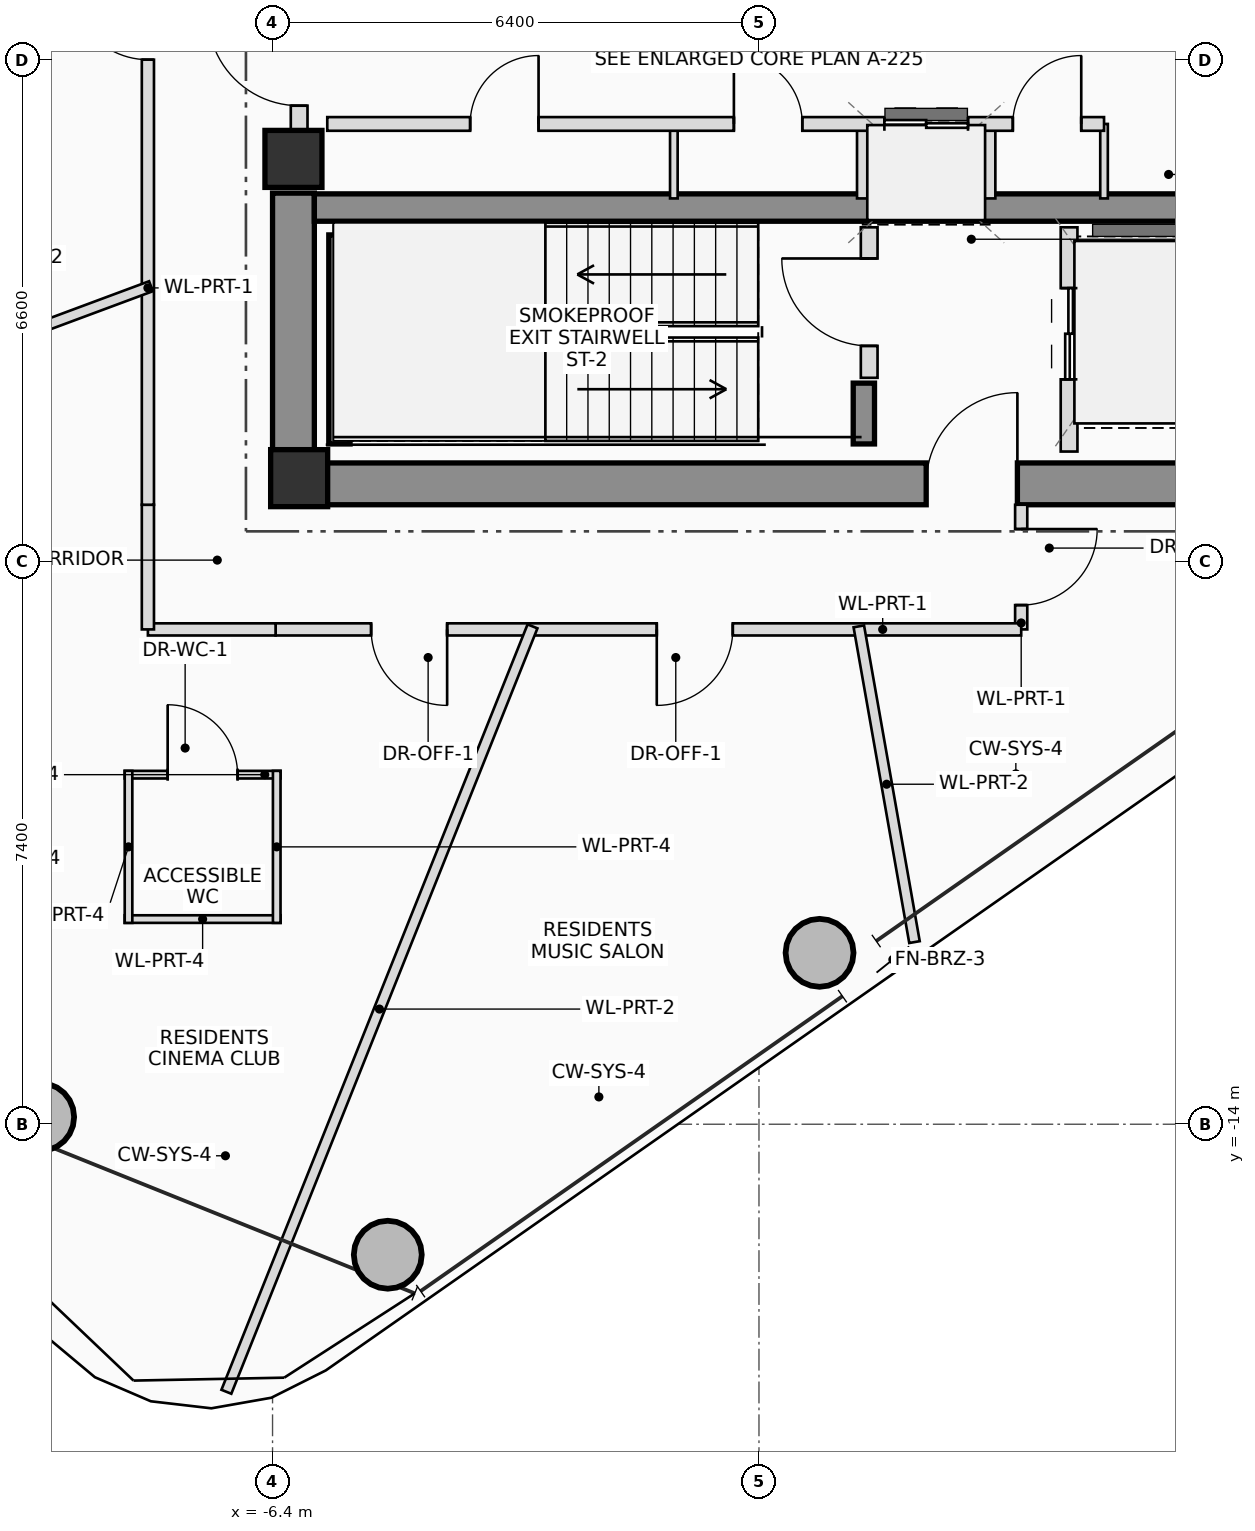
"""IFC4 building model, lengths in metres.
Left out: names, types, materials, properties, quantities, classifications, styles, units other than length and angle.
Written with IfcOpenShell. Run it as: python <this file> out.ifc"""

import sys

from ifc_helpers import new_model, si_unit, direction, frame, frame_2d, origin, origin_2d, place, context, subcontext, project, spatial, rectangle, hollow_circle, extrude, source, transform, mapped, element, fill, save


model = new_model("IFC4")
c1 = context("Model", 3, precision=1e-05, world=origin(), true_north=direction((0.0, 1.0)))
c2 = subcontext(c1, "Body", "Model", "MODEL_VIEW")
j1 = project(units=[si_unit("LENGTHUNIT", "METRE"), si_unit("PLANEANGLEUNIT", "RADIAN")], contexts=[c1])
p1 = place(None, origin())
s1 = spatial("IfcSite", under=j1, at=p1, CompositionType="ELEMENT")
p2 = place(p1, origin())
s2 = spatial("IfcBuilding", under=s1, at=p2, CompositionType="ELEMENT")
p3 = place(p2, frame((0.0, 0.0, 267.75)))
s3 = spatial("IfcBuildingStorey", under=s2, at=p3, CompositionType="ELEMENT", Elevation=267.75)
m1 = source(origin(), c2, "Body", "SweptSolid", [
    extrude(rectangle(XDim=0.75, YDim=0.75, at=origin_2d()), origin(), (0.0, 0.0, 1.0), 3.4),
])
p4 = place(p3, frame((-6.05, -5.5, 0.0), z_axis=(0.0, 0.0, 1.0), x_axis=(1.0, 0.0, 0.0)))
e1 = element("IfcColumn", 1, at=p4, inside=s3, PredefinedType="COLUMN", context=c2, shape_type="MappedRepresentation", body=[
    mapped(m1, transform((0.0, 0.0, 0.0), scale=1.0)),
])
p5 = place(p3, frame((-6.4, -5.575, 0.0), z_axis=(0.0, 0.0, 1.0), x_axis=(1.0, 0.0, 0.0)))
e2 = element("IfcWall", 2, at=p5, inside=s3, PredefinedType="SHEAR", context=c2, shape_type="SweptSolid", body=[
    extrude(rectangle(XDim=12.8, YDim=0.55, at=frame_2d((6.4, 0.0))), origin(), (0.0, 0.0, 1.0), 3.4),
])
p6 = place(p5, frame((8.6, 0.0, 0.0)))
e3 = element("IfcOpeningElement", 3, at=p6, cuts=e2, PredefinedType="OPENING", context=c2, shape_type="SweptSolid", body=[
    extrude(rectangle(XDim=1.2, YDim=2.2, at=frame_2d((0.6, 1.1))), frame((0.0, 0.285, 0.0), z_axis=(0.0, -1.0, 0.0), x_axis=(1.0, 0.0, 0.0)), (0.0, 0.0, 1.0), 0.57),
])
p7 = place(p3, frame((-6.125, -5.3, 0.0), z_axis=(0.0, 0.0, 1.0), x_axis=(0.0, 1.0, 0.0)))
e4 = element("IfcWall", 4, at=p7, inside=s3, PredefinedType="SHEAR", context=c2, shape_type="SweptSolid", body=[
    extrude(rectangle(XDim=3.55, YDim=0.55, at=frame_2d((1.775, 0.0))), origin(), (0.0, 0.0, 1.0), 3.4),
])
p8 = place(p3, frame((-5.85, -1.94, 0.0), z_axis=(0.0, 0.0, 1.0), x_axis=(1.0, 0.0, 0.0)))
e5 = element("IfcWall", 5, at=p8, inside=s3, PredefinedType="SHEAR", context=c2, shape_type="SweptSolid", body=[
    extrude(rectangle(XDim=11.7, YDim=0.36, at=frame_2d((5.85, 0.0))), origin(), (0.0, 0.0, 1.0), 3.4),
])
p9 = place(p3, frame((-5.52, -5.05, 0.0), z_axis=(0.0, 0.0, 1.0), x_axis=(0.0, 1.0, 0.0)))
e6 = element("IfcWall", 6, at=p9, inside=s3, PredefinedType="SHEAR", context=c2, shape_type="SweptSolid", body=[
    extrude(rectangle(XDim=2.75, YDim=0.28, at=frame_2d((1.375, 0.0))), origin(), (0.0, 0.0, 1.0), 3.4),
])
p10 = place(p3, frame((1.38, -5.05, 0.0), z_axis=(0.0, 0.0, 1.0), x_axis=(0.0, 1.0, 0.0)))
e7 = element("IfcWall", 7, at=p10, inside=s3, PredefinedType="SHEAR", context=c2, shape_type="SweptSolid", body=[
    extrude(rectangle(XDim=0.8, YDim=0.28, at=frame_2d((0.4, 0.0))), origin(), (0.0, 0.0, 1.0), 3.4),
])
p11 = place(p3, frame((-6.125, -1.3, 0.0), z_axis=(0.0, 0.0, 1.0), x_axis=(1.0, 0.0, 0.0)))
e8 = element("IfcColumn", 8, at=p11, inside=s3, PredefinedType="COLUMN", context=c2, shape_type="MappedRepresentation", body=[
    mapped(m1, transform((0.0, 0.0, 0.0), scale=1.0)),
])
m2 = source(origin(), c2, "Body", "SweptSolid", [
    extrude(hollow_circle(Radius=0.45, WallThickness=0.032, at=origin_2d()), origin(), (0.0, 0.0, 1.0), 3.4),
])
for number, where, z_axis, x_axis in (
    (9, (-4.884, -15.717, 0.0), (0.0, 0.0, 1.0), (1.0, 0.0, 0.0)),
    (10, (0.797, -11.745, 0.0), (0.0, 0.0, 1.0), (1.0, 0.0, 0.0)),
    (11, (-9.458, -13.905, 0.0), (0.0, 0.0, 1.0), (1.0, 0.0, 0.0)),
):
    element("IfcColumn", number, at=place(p3, frame(where, z_axis=z_axis, x_axis=x_axis)), inside=s3, PredefinedType="COLUMN", context=c2, shape_type="MappedRepresentation", body=[
        mapped(m2, transform((0.0, 0.0, 0.0), scale=1.0)),
    ])
p12 = place(p3, frame((-6.05, -0.95, 0.0), z_axis=(0.0, 0.0, 1.0), x_axis=(0.0, 1.0, 0.0)))
e12 = element("IfcWall", 12, at=p12, inside=s3, PredefinedType="PLUMBINGWALL", context=c2, shape_type="SweptSolid", body=[
    extrude(rectangle(XDim=1.9, YDim=0.22, at=frame_2d((0.95, 0.0))), origin(), (0.0, 0.0, 1.0), 2.18),
])
p13 = place(p12, frame((0.35, 0.0, 0.0)))
e13 = element("IfcOpeningElement", 13, at=p13, cuts=e12, PredefinedType="OPENING", context=c2, shape_type="SweptSolid", body=[
    extrude(rectangle(XDim=1.2, YDim=2.2, at=frame_2d((0.6, 1.1))), frame((0.0, 0.12, 0.0), z_axis=(0.0, -1.0, 0.0), x_axis=(1.0, 0.0, 0.0)), (0.0, 0.0, 1.0), 0.24),
])
p14 = place(p3, frame((1.45, -4.18, 0.0), z_axis=(0.0, 0.0, 1.0), x_axis=(0.0, 1.0, 0.0)))
e14 = element("IfcWall", 14, at=p14, inside=s3, PredefinedType="PLUMBINGWALL", context=c2, shape_type="SweptSolid", body=[
    extrude(rectangle(XDim=1.98, YDim=0.22, at=frame_2d((0.99, 0.0))), origin(), (0.0, 0.0, 1.0), 3.2),
])
p15 = place(p14, frame((0.42, 0.0, 0.0)))
e15 = element("IfcOpeningElement", 15, at=p15, cuts=e14, PredefinedType="OPENING", context=c2, shape_type="SweptSolid", body=[
    extrude(rectangle(XDim=1.15, YDim=2.15, at=frame_2d((0.575, 1.075))), frame((0.0, 0.12, 0.0), z_axis=(0.0, -1.0, 0.0), x_axis=(1.0, 0.0, 0.0)), (0.0, 0.0, 1.0), 0.24),
])
p16 = place(p3, frame((4.08, -5.15, 0.0), z_axis=(0.0, 0.0, 1.0), x_axis=(0.0, 1.0, 0.0)))
e16 = element("IfcWall", 16, at=p16, inside=s3, PredefinedType="PLUMBINGWALL", context=c2, shape_type="SweptSolid", body=[
    extrude(rectangle(XDim=2.95, YDim=0.22, at=frame_2d((1.475, 0.0))), origin(), (0.0, 0.0, 1.0), 3.2),
])
p17 = place(p16, frame((0.95, 0.0, 0.0)))
e17 = element("IfcOpeningElement", 17, at=p17, cuts=e16, PredefinedType="OPENING", context=c2, shape_type="SweptSolid", body=[
    extrude(rectangle(XDim=1.2, YDim=2.25, at=frame_2d((0.6, 1.125))), frame((0.0, 0.12, 0.0), z_axis=(0.0, -1.0, 0.0), x_axis=(1.0, 0.0, 0.0)), (0.0, 0.0, 1.0), 0.24),
])
p18 = place(p3, frame((-1.12, -1.82, 0.0), z_axis=(0.0, 0.0, 1.0), x_axis=(0.0, 1.0, 0.0)))
e18 = element("IfcWall", 18, at=p18, inside=s3, PredefinedType="PARTITIONING", context=c2, shape_type="SweptSolid", body=[
    extrude(rectangle(XDim=0.98, YDim=0.1, at=frame_2d((0.49, 0.0))), origin(), (0.0, 0.0, 1.0), 3.2),
])
for number, where, z_axis, x_axis in (
    (19, (1.38, -1.82, 0.0), (0.0, 0.0, 1.0), (0.0, 1.0, 0.0)),
    (20, (3.02, -1.82, 0.0), (0.0, 0.0, 1.0), (0.0, 1.0, 0.0)),
):
    element("IfcWall", number, at=place(p3, frame(where, z_axis=z_axis, x_axis=x_axis)), inside=s3, PredefinedType="PLUMBINGWALL", context=c2, shape_type="SweptSolid", body=[
        extrude(rectangle(XDim=0.98, YDim=0.18, at=frame_2d((0.49, 0.0))), origin(), (0.0, 0.0, 1.0), 3.2),
    ])
p19 = place(p3, frame((4.54, -1.82, 0.0), z_axis=(0.0, 0.0, 1.0), x_axis=(0.0, 1.0, 0.0)))
e21 = element("IfcWall", 21, at=p19, inside=s3, PredefinedType="PARTITIONING", context=c2, shape_type="SweptSolid", body=[
    extrude(rectangle(XDim=0.98, YDim=0.1, at=frame_2d((0.49, 0.0))), origin(), (0.0, 0.0, 1.0), 3.2),
])
p20 = place(p3, frame((-5.68, -0.84, 0.0), z_axis=(0.0, 0.0, 1.0), x_axis=(1.0, 0.0, 0.0)))
e22 = element("IfcWall", 22, at=p20, inside=s3, PredefinedType="PLUMBINGWALL", context=c2, shape_type="SweptSolid", body=[
    extrude(rectangle(XDim=10.22, YDim=0.18, at=frame_2d((5.11, 0.0))), origin(), (0.0, 0.0, 1.0), 3.2),
])
p21 = place(p20, frame((1.88, 0.0, 0.0)))
e23 = element("IfcOpeningElement", 23, at=p21, cuts=e22, PredefinedType="OPENING", context=c2, shape_type="SweptSolid", body=[
    extrude(rectangle(XDim=0.9, YDim=2.05, at=frame_2d((0.45, 1.025))), frame((0.0, 0.1, 0.0), z_axis=(0.0, -1.0, 0.0), x_axis=(1.0, 0.0, 0.0)), (0.0, 0.0, 1.0), 0.2),
])
p22 = place(p20, frame((5.35, 0.0, 0.0)))
e24 = element("IfcOpeningElement", 24, at=p22, cuts=e22, PredefinedType="OPENING", context=c2, shape_type="SweptSolid", body=[
    extrude(rectangle(XDim=0.9, YDim=2.05, at=frame_2d((0.45, 1.025))), frame((0.0, 0.1, 0.0), z_axis=(0.0, -1.0, 0.0), x_axis=(1.0, 0.0, 0.0)), (0.0, 0.0, 1.0), 0.2),
])
p23 = place(p20, frame((7.33, 0.0, 0.0)))
e25 = element("IfcOpeningElement", 25, at=p23, cuts=e22, PredefinedType="OPENING", context=c2, shape_type="SweptSolid", body=[
    extrude(rectangle(XDim=1.1, YDim=2.2, at=frame_2d((0.55, 1.1))), frame((0.0, 0.1, 0.0), z_axis=(0.0, -1.0, 0.0), x_axis=(1.0, 0.0, 0.0)), (0.0, 0.0, 1.0), 0.2),
])
p24 = place(p20, frame((9.02, 0.0, 0.0)))
e26 = element("IfcOpeningElement", 26, at=p24, cuts=e22, PredefinedType="OPENING", context=c2, shape_type="SweptSolid", body=[
    extrude(rectangle(XDim=0.9, YDim=2.05, at=frame_2d((0.45, 1.025))), frame((0.0, 0.1, 0.0), z_axis=(0.0, -1.0, 0.0), x_axis=(1.0, 0.0, 0.0)), (0.0, 0.0, 1.0), 0.2),
])
p25 = place(p3, frame((-8.345, -9.401, 0.0), z_axis=(0.0, 0.0, 1.0), x_axis=(1.0, 0.0, 0.0)))
e27 = element("IfcWall", 27, at=p25, inside=s3, PredefinedType="PARTITIONING", context=c2, shape_type="SweptSolid", body=[
    extrude(rectangle(XDim=2.05, YDim=0.1, at=frame_2d((1.025, 0.0))), origin(), (0.0, 0.0, 1.0), 2.605),
])
p26 = place(p25, frame((0.565, 0.0, 0.0)))
e28 = element("IfcOpeningElement", 28, at=p26, cuts=e27, PredefinedType="OPENING", context=c2, shape_type="SweptSolid", body=[
    extrude(rectangle(XDim=0.92, YDim=2.1, at=frame_2d((0.46, 1.05))), frame((0.0, 0.06, 0.0), z_axis=(0.0, -1.0, 0.0), x_axis=(1.0, 0.0, 0.0)), (0.0, 0.0, 1.0), 0.12),
])
p27 = place(p3, frame((-6.295, -11.301, 0.0), z_axis=(0.0, 0.0, 1.0), x_axis=(-1.0, 0.0, 0.0)))
e29 = element("IfcWall", 29, at=p27, inside=s3, PredefinedType="PARTITIONING", context=c2, shape_type="SweptSolid", body=[
    extrude(rectangle(XDim=2.05, YDim=0.1, at=frame_2d((1.025, 0.0))), origin(), (0.0, 0.0, 1.0), 3.2),
])
p28 = place(p3, frame((-6.345, -9.351, 0.0), z_axis=(0.0, 0.0, 1.0), x_axis=(0.0, -1.0, 0.0)))
e30 = element("IfcWall", 30, at=p28, inside=s3, PredefinedType="PARTITIONING", context=c2, shape_type="SweptSolid", body=[
    extrude(rectangle(XDim=2.0, YDim=0.1, at=frame_2d((1.0, 0.0))), origin(), (0.0, 0.0, 1.0), 2.805),
])
p29 = place(p3, frame((-8.295, -11.351, 0.0), z_axis=(0.0, 0.0, 1.0), x_axis=(0.0, 1.0, 0.0)))
e31 = element("IfcWall", 31, at=p29, inside=s3, PredefinedType="PARTITIONING", context=c2, shape_type="SweptSolid", body=[
    extrude(rectangle(XDim=2.0, YDim=0.1, at=frame_2d((1.0, 0.0))), origin(), (0.0, 0.0, 1.0), 2.605),
])
p30 = place(p3, frame((3.45, -5.85, 0.0), z_axis=(0.0, 0.0, 1.0), x_axis=(0.0, -1.0, 0.0)))
e32 = element("IfcWall", 32, at=p30, inside=s3, PredefinedType="PARTITIONING", context=c2, shape_type="SweptSolid", body=[
    extrude(rectangle(XDim=1.64, YDim=0.16, at=frame_2d((0.82, 0.0))), origin(), (0.0, 0.0, 1.0), 3.2),
])
p31 = place(p30, frame((0.32, 0.0, 0.0)))
e33 = element("IfcOpeningElement", 33, at=p31, cuts=e32, PredefinedType="OPENING", context=c2, shape_type="SweptSolid", body=[
    extrude(rectangle(XDim=1.0, YDim=2.25, at=frame_2d((0.5, 1.125))), frame((0.0, 0.09, 0.0), z_axis=(0.0, -1.0, 0.0), x_axis=(1.0, 0.0, 0.0)), (0.0, 0.0, 1.0), 0.18),
])
p32 = place(p3, frame((3.45, -7.49, 0.0), z_axis=(0.0, 0.0, 1.0), x_axis=(-1.0, 0.0, 0.0)))
e34 = element("IfcWall", 34, at=p32, inside=s3, PredefinedType="PARTITIONING", context=c2, shape_type="SweptSolid", body=[
    extrude(rectangle(XDim=9.81, YDim=0.16, at=frame_2d((4.905, 0.0))), origin(), (0.0, 0.0, 1.0), 2.605),
])
p33 = place(p32, frame((3.795, 0.0, 0.0)))
e35 = element("IfcOpeningElement", 35, at=p33, cuts=e34, PredefinedType="OPENING", context=c2, shape_type="SweptSolid", body=[
    extrude(rectangle(XDim=1.0, YDim=2.25, at=frame_2d((0.5, 1.125))), frame((0.0, 0.09, 0.0), z_axis=(0.0, -1.0, 0.0), x_axis=(1.0, 0.0, 0.0)), (0.0, 0.0, 1.0), 0.18),
])
p34 = place(p32, frame((7.553, 0.0, 0.0)))
e36 = element("IfcOpeningElement", 36, at=p34, cuts=e34, PredefinedType="OPENING", context=c2, shape_type="SweptSolid", body=[
    extrude(rectangle(XDim=1.0, YDim=2.25, at=frame_2d((0.5, 1.125))), frame((0.0, 0.09, 0.0), z_axis=(0.0, -1.0, 0.0), x_axis=(1.0, 0.0, 0.0)), (0.0, 0.0, 1.0), 0.18),
])
p35 = place(p3, frame((-6.36, -7.49, 0.0), z_axis=(0.0, 0.0, 1.0), x_axis=(-1.0, 0.0, 0.0)))
e37 = element("IfcWall", 37, at=p35, inside=s3, PredefinedType="PARTITIONING", context=c2, shape_type="SweptSolid", body=[
    extrude(rectangle(XDim=1.68, YDim=0.16, at=frame_2d((0.84, 0.0))), origin(), (0.0, 0.0, 1.0), 2.605),
])
p36 = place(p3, frame((-8.04, -7.49, 0.0), z_axis=(0.0, 0.0, 1.0), x_axis=(0.0, 1.0, 0.0)))
e38 = element("IfcWall", 38, at=p36, inside=s3, PredefinedType="PARTITIONING", context=c2, shape_type="SweptSolid", body=[
    extrude(rectangle(XDim=1.64, YDim=0.16, at=frame_2d((0.82, 0.0))), origin(), (0.0, 0.0, 1.0), 2.605),
])
p37 = place(p3, frame((-8.04, -5.85, 0.0), z_axis=(0.0, 0.0, 1.0), x_axis=(0.0, 1.0, 0.0)))
e39 = element("IfcWall", 39, at=p37, inside=s3, PredefinedType="PARTITIONING", context=c2, shape_type="SweptSolid", body=[
    extrude(rectangle(XDim=11.7, YDim=0.16, at=frame_2d((5.85, 0.0))), origin(), (0.0, 0.0, 1.0), 2.605),
])
p38 = place(p37, frame((5.855, 0.0, 0.0)))
e40 = element("IfcOpeningElement", 40, at=p38, cuts=e39, PredefinedType="OPENING", context=c2, shape_type="SweptSolid", body=[
    extrude(rectangle(XDim=1.0, YDim=2.25, at=frame_2d((0.5, 1.125))), frame((0.0, 0.09, 0.0), z_axis=(0.0, -1.0, 0.0), x_axis=(1.0, 0.0, 0.0)), (0.0, 0.0, 1.0), 0.18),
])
p39 = place(p3, frame((-8.0, -2.975, 0.0), z_axis=(0.0, 0.0, 1.0), x_axis=(-0.937281421119, -0.348573575627, 0.0)))
e41 = element("IfcWall", 41, at=p39, inside=s3, PredefinedType="PARTITIONING", context=c2, shape_type="SweptSolid", body=[
    extrude(rectangle(XDim=3.737, YDim=0.14, at=frame_2d((1.869, 0.0))), origin(), (0.0, 0.0, 1.0), 2.605),
])
p40 = place(p3, frame((-2.98, -7.45, 0.0), z_axis=(0.0, 0.0, 1.0), x_axis=(-0.37136350778, -0.928487557854, 0.0)))
e42 = element("IfcWall", 42, at=p40, inside=s3, PredefinedType="PARTITIONING", context=c2, shape_type="SweptSolid", body=[
    extrude(rectangle(XDim=10.845, YDim=0.14, at=frame_2d((5.423, 0.0))), origin(), (0.0, 0.0, 1.0), 2.605),
])
p41 = place(p3, frame((1.314, -7.45, 0.0), z_axis=(0.0, 0.0, 1.0), x_axis=(0.17364664795, -0.984808022741, 0.0)))
e43 = element("IfcWall", 43, at=p41, inside=s3, PredefinedType="PARTITIONING", context=c2, shape_type="SweptSolid", body=[
    extrude(rectangle(XDim=4.218, YDim=0.14, at=frame_2d((2.109, 0.0))), origin(), (0.0, 0.0, 1.0), 2.605),
])
p42 = place(p6, origin())
e44 = element("IfcDoor", 44, at=p42, inside=s3, OperationType="SINGLE_SWING_RIGHT", PredefinedType="DOOR", context=c2, shape_type="SweptSolid", body=[
    extrude(rectangle(XDim=1.2, YDim=2.2, at=frame_2d((0.6, 1.1))), frame((0.0, 0.025, 0.0), z_axis=(0.0, -1.0, 0.0), x_axis=(1.0, 0.0, 0.0)), (0.0, 0.0, 1.0), 0.05),
])
fill(e3, e44)
p43 = place(p13, origin())
e45 = element("IfcDoor", 45, at=p43, inside=s3, OperationType="SINGLE_SWING_RIGHT", PredefinedType="DOOR", context=c2, shape_type="SweptSolid", body=[
    extrude(rectangle(XDim=1.2, YDim=2.2, at=frame_2d((0.6, 1.1))), frame((0.0, 0.025, 0.0), z_axis=(0.0, -1.0, 0.0), x_axis=(1.0, 0.0, 0.0)), (0.0, 0.0, 1.0), 0.05),
])
fill(e13, e45)
p44 = place(p15, origin())
e46 = element("IfcDoor", 46, at=p44, inside=s3, OperationType="SINGLE_SWING_RIGHT", PredefinedType="DOOR", context=c2, shape_type="SweptSolid", body=[
    extrude(rectangle(XDim=1.15, YDim=2.15, at=frame_2d((0.575, 1.075))), frame((0.0, 0.025, 0.0), z_axis=(0.0, -1.0, 0.0), x_axis=(1.0, 0.0, 0.0)), (0.0, 0.0, 1.0), 0.05),
])
fill(e15, e46)
p45 = place(p17, origin())
e47 = element("IfcDoor", 47, at=p45, inside=s3, OperationType="DOUBLE_DOOR_SLIDING", PredefinedType="DOOR", context=c2, shape_type="SweptSolid", body=[
    extrude(rectangle(XDim=1.2, YDim=2.25, at=frame_2d((0.6, 1.125))), frame((0.0, 0.025, 0.0), z_axis=(0.0, -1.0, 0.0), x_axis=(1.0, 0.0, 0.0)), (0.0, 0.0, 1.0), 0.05),
])
fill(e17, e47)
p46 = place(p21, origin())
e48 = element("IfcDoor", 48, at=p46, inside=s3, OperationType="SINGLE_SWING_RIGHT", PredefinedType="DOOR", context=c2, shape_type="SweptSolid", body=[
    extrude(rectangle(XDim=0.9, YDim=2.05, at=frame_2d((0.45, 1.025))), frame((0.0, 0.025, 0.0), z_axis=(0.0, -1.0, 0.0), x_axis=(1.0, 0.0, 0.0)), (0.0, 0.0, 1.0), 0.05),
])
fill(e23, e48)
p47 = place(p22, origin())
e49 = element("IfcDoor", 49, at=p47, inside=s3, OperationType="SINGLE_SWING_LEFT", PredefinedType="DOOR", context=c2, shape_type="SweptSolid", body=[
    extrude(rectangle(XDim=0.9, YDim=2.05, at=frame_2d((0.45, 1.025))), frame((0.0, 0.025, 0.0), z_axis=(0.0, -1.0, 0.0), x_axis=(1.0, 0.0, 0.0)), (0.0, 0.0, 1.0), 0.05),
])
fill(e24, e49)
p48 = place(p23, origin())
e50 = element("IfcDoor", 50, at=p48, inside=s3, OperationType="DOUBLE_DOOR_SLIDING", PredefinedType="DOOR", context=c2, shape_type="SweptSolid", body=[
    extrude(rectangle(XDim=1.1, YDim=2.2, at=frame_2d((0.55, 1.1))), frame((0.0, 0.025, 0.0), z_axis=(0.0, -1.0, 0.0), x_axis=(1.0, 0.0, 0.0)), (0.0, 0.0, 1.0), 0.05),
])
fill(e25, e50)
p49 = place(p24, origin())
e51 = element("IfcDoor", 51, at=p49, inside=s3, OperationType="SINGLE_SWING_RIGHT", PredefinedType="DOOR", context=c2, shape_type="SweptSolid", body=[
    extrude(rectangle(XDim=0.9, YDim=2.05, at=frame_2d((0.45, 1.025))), frame((0.0, 0.025, 0.0), z_axis=(0.0, -1.0, 0.0), x_axis=(1.0, 0.0, 0.0)), (0.0, 0.0, 1.0), 0.05),
])
fill(e26, e51)
p50 = place(p26, origin())
e52 = element("IfcDoor", 52, at=p50, inside=s3, OperationType="SINGLE_SWING_LEFT", PredefinedType="DOOR", context=c2, shape_type="SweptSolid", body=[
    extrude(rectangle(XDim=0.92, YDim=2.1, at=frame_2d((0.46, 1.05))), frame((0.0, 0.025, 0.0), z_axis=(0.0, -1.0, 0.0), x_axis=(1.0, 0.0, 0.0)), (0.0, 0.0, 1.0), 0.05),
])
fill(e28, e52)
p51 = place(p31, origin())
e53 = element("IfcDoor", 53, at=p51, inside=s3, OperationType="SINGLE_SWING_LEFT", PredefinedType="DOOR", context=c2, shape_type="SweptSolid", body=[
    extrude(rectangle(XDim=1.0, YDim=2.25, at=frame_2d((0.5, 1.125))), frame((0.0, 0.025, 0.0), z_axis=(0.0, -1.0, 0.0), x_axis=(1.0, 0.0, 0.0)), (0.0, 0.0, 1.0), 0.05),
])
fill(e33, e53)
p52 = place(p33, origin())
e54 = element("IfcDoor", 54, at=p52, inside=s3, OperationType="SINGLE_SWING_RIGHT", PredefinedType="DOOR", context=c2, shape_type="SweptSolid", body=[
    extrude(rectangle(XDim=1.0, YDim=2.25, at=frame_2d((0.5, 1.125))), frame((0.0, 0.025, 0.0), z_axis=(0.0, -1.0, 0.0), x_axis=(1.0, 0.0, 0.0)), (0.0, 0.0, 1.0), 0.05),
])
fill(e35, e54)
p53 = place(p34, origin())
e55 = element("IfcDoor", 55, at=p53, inside=s3, OperationType="SINGLE_SWING_LEFT", PredefinedType="DOOR", context=c2, shape_type="SweptSolid", body=[
    extrude(rectangle(XDim=1.0, YDim=2.25, at=frame_2d((0.5, 1.125))), frame((0.0, 0.025, 0.0), z_axis=(0.0, -1.0, 0.0), x_axis=(1.0, 0.0, 0.0)), (0.0, 0.0, 1.0), 0.05),
])
fill(e36, e55)
p54 = place(p38, origin())
e56 = element("IfcDoor", 56, at=p54, inside=s3, OperationType="SINGLE_SWING_RIGHT", PredefinedType="DOOR", context=c2, shape_type="SweptSolid", body=[
    extrude(rectangle(XDim=1.0, YDim=2.25, at=frame_2d((0.5, 1.125))), frame((0.0, 0.025, 0.0), z_axis=(0.0, -1.0, 0.0), x_axis=(1.0, 0.0, 0.0)), (0.0, 0.0, 1.0), 0.05),
])
fill(e40, e56)
save(model, sys.argv[1])
